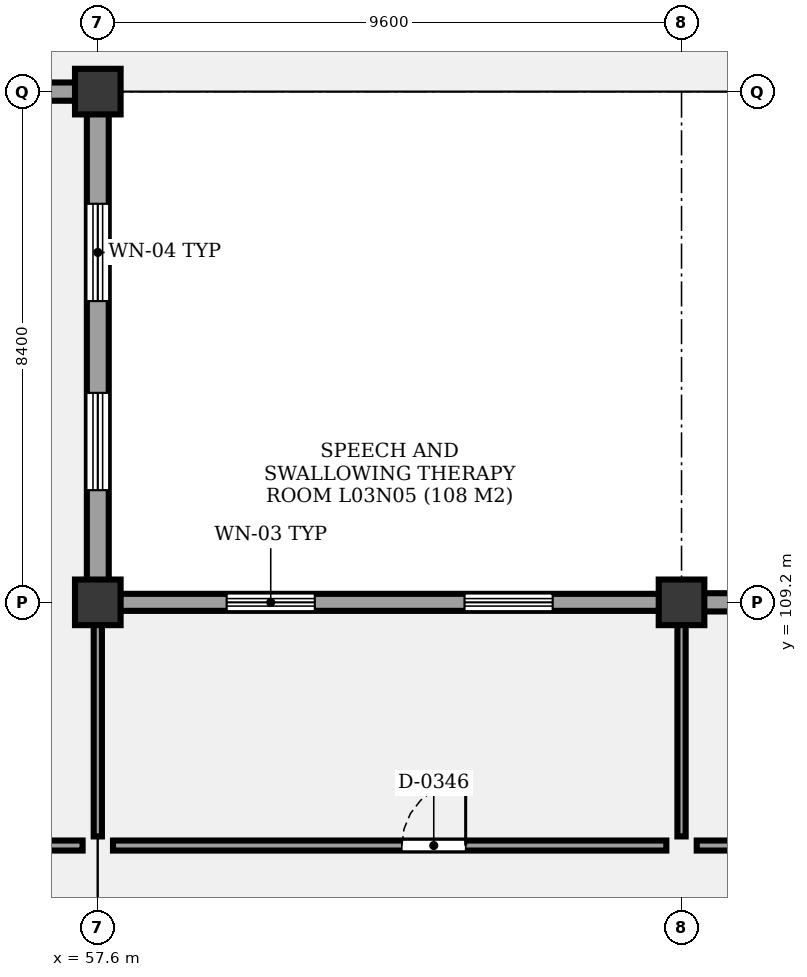
"""IFC4 building model, lengths in metres.
Left out: names, types, materials, properties, quantities, classifications, styles, units other than length and angle.
Written with IfcOpenShell. Run it as: python <this file> out.ifc"""

import sys

from ifc_helpers import new_model, si_unit, direction, frame, frame_2d, origin, origin_2d, place, context, subcontext, project, spatial, rectangle, extrude, element, fill, save


model = new_model("IFC4")
c1 = context("Model", 3, precision=1e-05, world=origin(), true_north=direction((0.0, 1.0)))
c2 = subcontext(c1, "Body", "Model", "MODEL_VIEW")
j1 = project(units=[si_unit("LENGTHUNIT", "METRE"), si_unit("PLANEANGLEUNIT", "RADIAN")], contexts=[c1])
p1 = place(None, origin())
s1 = spatial("IfcSite", under=j1, at=p1, CompositionType="ELEMENT")
p2 = place(p1, origin())
s2 = spatial("IfcBuilding", under=s1, at=p2, CompositionType="ELEMENT")
p3 = place(p2, frame((0.0, 0.0, 13.5)))
s3 = spatial("IfcBuildingStorey", under=s2, at=p3, CompositionType="ELEMENT", Elevation=13.5)
for number, where, z_axis, x_axis in (
    (1, (57.6, 109.2, 0.0), (0.0, 0.0, 1.0), (1.0, 0.0, 0.0)),
    (2, (57.6, 117.6, 0.0), (0.0, 0.0, 1.0), (1.0, 0.0, 0.0)),
    (3, (67.2, 109.2, 0.0), (0.0, 0.0, 1.0), (1.0, 0.0, 0.0)),
):
    element("IfcColumn", number, at=place(p3, frame(where, z_axis=z_axis, x_axis=x_axis)), inside=s3, PredefinedType="COLUMN", context=c2, shape_type="SweptSolid", body=[
        extrude(rectangle(XDim=0.75, YDim=0.75, at=origin_2d()), origin(), (0.0, 0.0, 1.0), 4.3),
    ])
p4 = place(p3, frame((57.6, 109.2, 0.0), z_axis=(0.0, 0.0, 1.0), x_axis=(1.0, 0.0, 0.0)))
e4 = element("IfcWall", 4, at=p4, inside=s3, PredefinedType="SOLIDWALL", context=c2, shape_type="SweptSolid", body=[
    extrude(rectangle(XDim=9.6, YDim=0.28, at=frame_2d((4.8, 0.0))), origin(), (0.0, 0.0, 1.0), 3.49),
])
p5 = place(p4, frame((2.119, 0.0, 0.85)))
e5 = element("IfcOpeningElement", 5, at=p5, cuts=e4, PredefinedType="OPENING", context=c2, shape_type="SweptSolid", body=[
    extrude(rectangle(XDim=1.45, YDim=1.2, at=frame_2d((0.725, 0.6))), frame((0.0, 0.15, 0.0), z_axis=(0.0, -1.0, 0.0), x_axis=(1.0, 0.0, 0.0)), (0.0, 0.0, 1.0), 0.3),
])
p6 = place(p4, frame((6.031, 0.0, 0.85)))
e6 = element("IfcOpeningElement", 6, at=p6, cuts=e4, PredefinedType="OPENING", context=c2, shape_type="SweptSolid", body=[
    extrude(rectangle(XDim=1.45, YDim=1.2, at=frame_2d((0.725, 0.6))), frame((0.0, 0.15, 0.0), z_axis=(0.0, -1.0, 0.0), x_axis=(1.0, 0.0, 0.0)), (0.0, 0.0, 1.0), 0.3),
])
p7 = place(p3, frame((67.2, 109.2, 0.0), z_axis=(0.0, 0.0, 1.0), x_axis=(1.0, 0.0, 0.0)))
e7 = element("IfcWall", 7, at=p7, inside=s3, PredefinedType="SOLIDWALL", context=c2, shape_type="SweptSolid", body=[
    extrude(rectangle(XDim=9.6, YDim=0.3, at=frame_2d((4.8, 0.0))), origin(), (0.0, 0.0, 1.0), 3.49),
])
p8 = place(p7, frame((2.158, 0.0, 0.85)))
e8 = element("IfcOpeningElement", 8, at=p8, cuts=e7, PredefinedType="OPENING", context=c2, shape_type="SweptSolid", body=[
    extrude(rectangle(XDim=1.3, YDim=1.2, at=frame_2d((0.65, 0.6))), frame((0.0, 0.16, 0.0), z_axis=(0.0, -1.0, 0.0), x_axis=(1.0, 0.0, 0.0)), (0.0, 0.0, 1.0), 0.32),
])
p9 = place(p7, frame((6.142, 0.0, 0.85)))
e9 = element("IfcOpeningElement", 9, at=p9, cuts=e7, PredefinedType="OPENING", context=c2, shape_type="SweptSolid", body=[
    extrude(rectangle(XDim=1.3, YDim=1.2, at=frame_2d((0.65, 0.6))), frame((0.0, 0.16, 0.0), z_axis=(0.0, -1.0, 0.0), x_axis=(1.0, 0.0, 0.0)), (0.0, 0.0, 1.0), 0.32),
])
p10 = place(p3, frame((48.0, 117.6, 0.0), z_axis=(0.0, 0.0, 1.0), x_axis=(1.0, 0.0, 0.0)))
e10 = element("IfcWall", 10, at=p10, inside=s3, PredefinedType="SOLIDWALL", context=c2, shape_type="SweptSolid", body=[
    extrude(rectangle(XDim=9.6, YDim=0.3, at=frame_2d((4.8, 0.0))), origin(), (0.0, 0.0, 1.0), 3.49),
])
p11 = place(p10, frame((2.119, 0.0, 0.85)))
e11 = element("IfcOpeningElement", 11, at=p11, cuts=e10, PredefinedType="OPENING", context=c2, shape_type="SweptSolid", body=[
    extrude(rectangle(XDim=1.45, YDim=1.2, at=frame_2d((0.725, 0.6))), frame((0.0, 0.16, 0.0), z_axis=(0.0, -1.0, 0.0), x_axis=(1.0, 0.0, 0.0)), (0.0, 0.0, 1.0), 0.32),
])
p12 = place(p10, frame((6.031, 0.0, 0.85)))
e12 = element("IfcOpeningElement", 12, at=p12, cuts=e10, PredefinedType="OPENING", context=c2, shape_type="SweptSolid", body=[
    extrude(rectangle(XDim=1.45, YDim=1.2, at=frame_2d((0.725, 0.6))), frame((0.0, 0.16, 0.0), z_axis=(0.0, -1.0, 0.0), x_axis=(1.0, 0.0, 0.0)), (0.0, 0.0, 1.0), 0.32),
])
p13 = place(p3, frame((57.6, 117.44, 0.0), z_axis=(0.0, 0.0, 1.0), x_axis=(0.0, -1.0, 0.0)))
e13 = element("IfcWall", 13, at=p13, inside=s3, PredefinedType="SOLIDWALL", context=c2, shape_type="SweptSolid", body=[
    extrude(rectangle(XDim=8.08, YDim=0.36, at=frame_2d((4.04, 0.0))), origin(), (0.0, 0.0, 1.0), 3.49),
])
p14 = place(p13, frame((1.685, 0.0, 0.85)))
e14 = element("IfcOpeningElement", 14, at=p14, cuts=e13, PredefinedType="OPENING", context=c2, shape_type="SweptSolid", body=[
    extrude(rectangle(XDim=1.6, YDim=1.2, at=frame_2d((0.8, 0.6))), frame((0.0, 0.19, 0.0), z_axis=(0.0, -1.0, 0.0), x_axis=(1.0, 0.0, 0.0)), (0.0, 0.0, 1.0), 0.38),
])
p15 = place(p13, frame((4.795, 0.0, 0.85)))
e15 = element("IfcOpeningElement", 15, at=p15, cuts=e13, PredefinedType="OPENING", context=c2, shape_type="SweptSolid", body=[
    extrude(rectangle(XDim=1.6, YDim=1.2, at=frame_2d((0.8, 0.6))), frame((0.0, 0.19, 0.0), z_axis=(0.0, -1.0, 0.0), x_axis=(1.0, 0.0, 0.0)), (0.0, 0.0, 1.0), 0.38),
])
p16 = place(p3, frame((48.25, 105.2, 0.0), z_axis=(0.0, 0.0, 1.0), x_axis=(1.0, 0.0, 0.0)))
e16 = element("IfcWall", 16, at=p16, inside=s3, PredefinedType="PARTITIONING", context=c2, shape_type="SweptSolid", body=[
    extrude(rectangle(XDim=9.1, YDim=0.165, at=frame_2d((4.55, 0.0))), origin(), (0.0, 0.0, 1.0), 3.4),
])
p17 = place(p16, frame((4.75, 0.0, 0.0)))
e17 = element("IfcOpeningElement", 17, at=p17, cuts=e16, PredefinedType="OPENING", context=c2, shape_type="SweptSolid", body=[
    extrude(rectangle(XDim=0.95, YDim=2.1, at=frame_2d((0.475, 1.05))), frame((0.0, 0.093, 0.0), z_axis=(0.0, -1.0, 0.0), x_axis=(1.0, 0.0, 0.0)), (0.0, 0.0, 1.0), 0.185),
])
p18 = place(p3, frame((57.85, 105.2, 0.0), z_axis=(0.0, 0.0, 1.0), x_axis=(1.0, 0.0, 0.0)))
e18 = element("IfcWall", 18, at=p18, inside=s3, PredefinedType="PARTITIONING", context=c2, shape_type="SweptSolid", body=[
    extrude(rectangle(XDim=9.1, YDim=0.165, at=frame_2d((4.55, 0.0))), origin(), (0.0, 0.0, 1.0), 3.4),
])
p19 = place(p18, frame((4.75, 0.0, 0.0)))
e19 = element("IfcOpeningElement", 19, at=p19, cuts=e18, PredefinedType="OPENING", context=c2, shape_type="SweptSolid", body=[
    extrude(rectangle(XDim=1.05, YDim=2.1, at=frame_2d((0.525, 1.05))), frame((0.0, 0.093, 0.0), z_axis=(0.0, -1.0, 0.0), x_axis=(1.0, 0.0, 0.0)), (0.0, 0.0, 1.0), 0.185),
])
p20 = place(p3, frame((57.6, 105.35, 0.0), z_axis=(0.0, 0.0, 1.0), x_axis=(0.0, 1.0, 0.0)))
e20 = element("IfcWall", 20, at=p20, inside=s3, PredefinedType="PARTITIONING", context=c2, shape_type="SweptSolid", body=[
    extrude(rectangle(XDim=3.65, YDim=0.135, at=frame_2d((1.825, 0.0))), origin(), (0.0, 0.0, 1.0), 3.4),
])
p21 = place(p3, frame((67.45, 105.2, 0.0), z_axis=(0.0, 0.0, 1.0), x_axis=(1.0, 0.0, 0.0)))
e21 = element("IfcWall", 21, at=p21, inside=s3, PredefinedType="PARTITIONING", context=c2, shape_type="SweptSolid", body=[
    extrude(rectangle(XDim=9.1, YDim=0.165, at=frame_2d((4.55, 0.0))), origin(), (0.0, 0.0, 1.0), 3.4),
])
p22 = place(p21, frame((4.75, 0.0, 0.0)))
e22 = element("IfcOpeningElement", 22, at=p22, cuts=e21, PredefinedType="OPENING", context=c2, shape_type="SweptSolid", body=[
    extrude(rectangle(XDim=0.95, YDim=2.1, at=frame_2d((0.475, 1.05))), frame((0.0, 0.093, 0.0), z_axis=(0.0, -1.0, 0.0), x_axis=(1.0, 0.0, 0.0)), (0.0, 0.0, 1.0), 0.185),
])
p23 = place(p3, frame((67.2, 105.35, 0.0), z_axis=(0.0, 0.0, 1.0), x_axis=(0.0, 1.0, 0.0)))
e23 = element("IfcWall", 23, at=p23, inside=s3, PredefinedType="PARTITIONING", context=c2, shape_type="SweptSolid", body=[
    extrude(rectangle(XDim=3.65, YDim=0.135, at=frame_2d((1.825, 0.0))), origin(), (0.0, 0.0, 1.0), 3.4),
])
p24 = place(p5, origin())
e24 = element("IfcWindow", 24, at=p24, inside=s3, PartitioningType="SINGLE_PANEL", PredefinedType="WINDOW", context=c2, shape_type="SweptSolid", body=[
    extrude(rectangle(XDim=1.45, YDim=1.2, at=frame_2d((0.725, 0.6))), frame((0.0, 0.03, 0.0), z_axis=(0.0, -1.0, 0.0), x_axis=(1.0, 0.0, 0.0)), (0.0, 0.0, 1.0), 0.06),
])
fill(e5, e24)
p25 = place(p6, origin())
e25 = element("IfcWindow", 25, at=p25, inside=s3, PartitioningType="SINGLE_PANEL", PredefinedType="WINDOW", context=c2, shape_type="SweptSolid", body=[
    extrude(rectangle(XDim=1.45, YDim=1.2, at=frame_2d((0.725, 0.6))), frame((0.0, 0.03, 0.0), z_axis=(0.0, -1.0, 0.0), x_axis=(1.0, 0.0, 0.0)), (0.0, 0.0, 1.0), 0.06),
])
fill(e6, e25)
p26 = place(p14, origin())
e26 = element("IfcWindow", 26, at=p26, inside=s3, PartitioningType="SINGLE_PANEL", PredefinedType="WINDOW", context=c2, shape_type="SweptSolid", body=[
    extrude(rectangle(XDim=1.6, YDim=1.2, at=frame_2d((0.8, 0.6))), frame((0.0, 0.03, 0.0), z_axis=(0.0, -1.0, 0.0), x_axis=(1.0, 0.0, 0.0)), (0.0, 0.0, 1.0), 0.06),
])
fill(e14, e26)
p27 = place(p15, origin())
e27 = element("IfcWindow", 27, at=p27, inside=s3, PartitioningType="SINGLE_PANEL", PredefinedType="WINDOW", context=c2, shape_type="SweptSolid", body=[
    extrude(rectangle(XDim=1.6, YDim=1.2, at=frame_2d((0.8, 0.6))), frame((0.0, 0.03, 0.0), z_axis=(0.0, -1.0, 0.0), x_axis=(1.0, 0.0, 0.0)), (0.0, 0.0, 1.0), 0.06),
])
fill(e15, e27)
p28 = place(p19, origin())
e28 = element("IfcDoor", 28, at=p28, inside=s3, OperationType="SINGLE_SWING_RIGHT", PredefinedType="DOOR", context=c2, shape_type="SweptSolid", body=[
    extrude(rectangle(XDim=1.05, YDim=2.1, at=frame_2d((0.525, 1.05))), frame((0.0, 0.025, 0.0), z_axis=(0.0, -1.0, 0.0), x_axis=(1.0, 0.0, 0.0)), (0.0, 0.0, 1.0), 0.05),
])
fill(e19, e28)
save(model, sys.argv[1])
